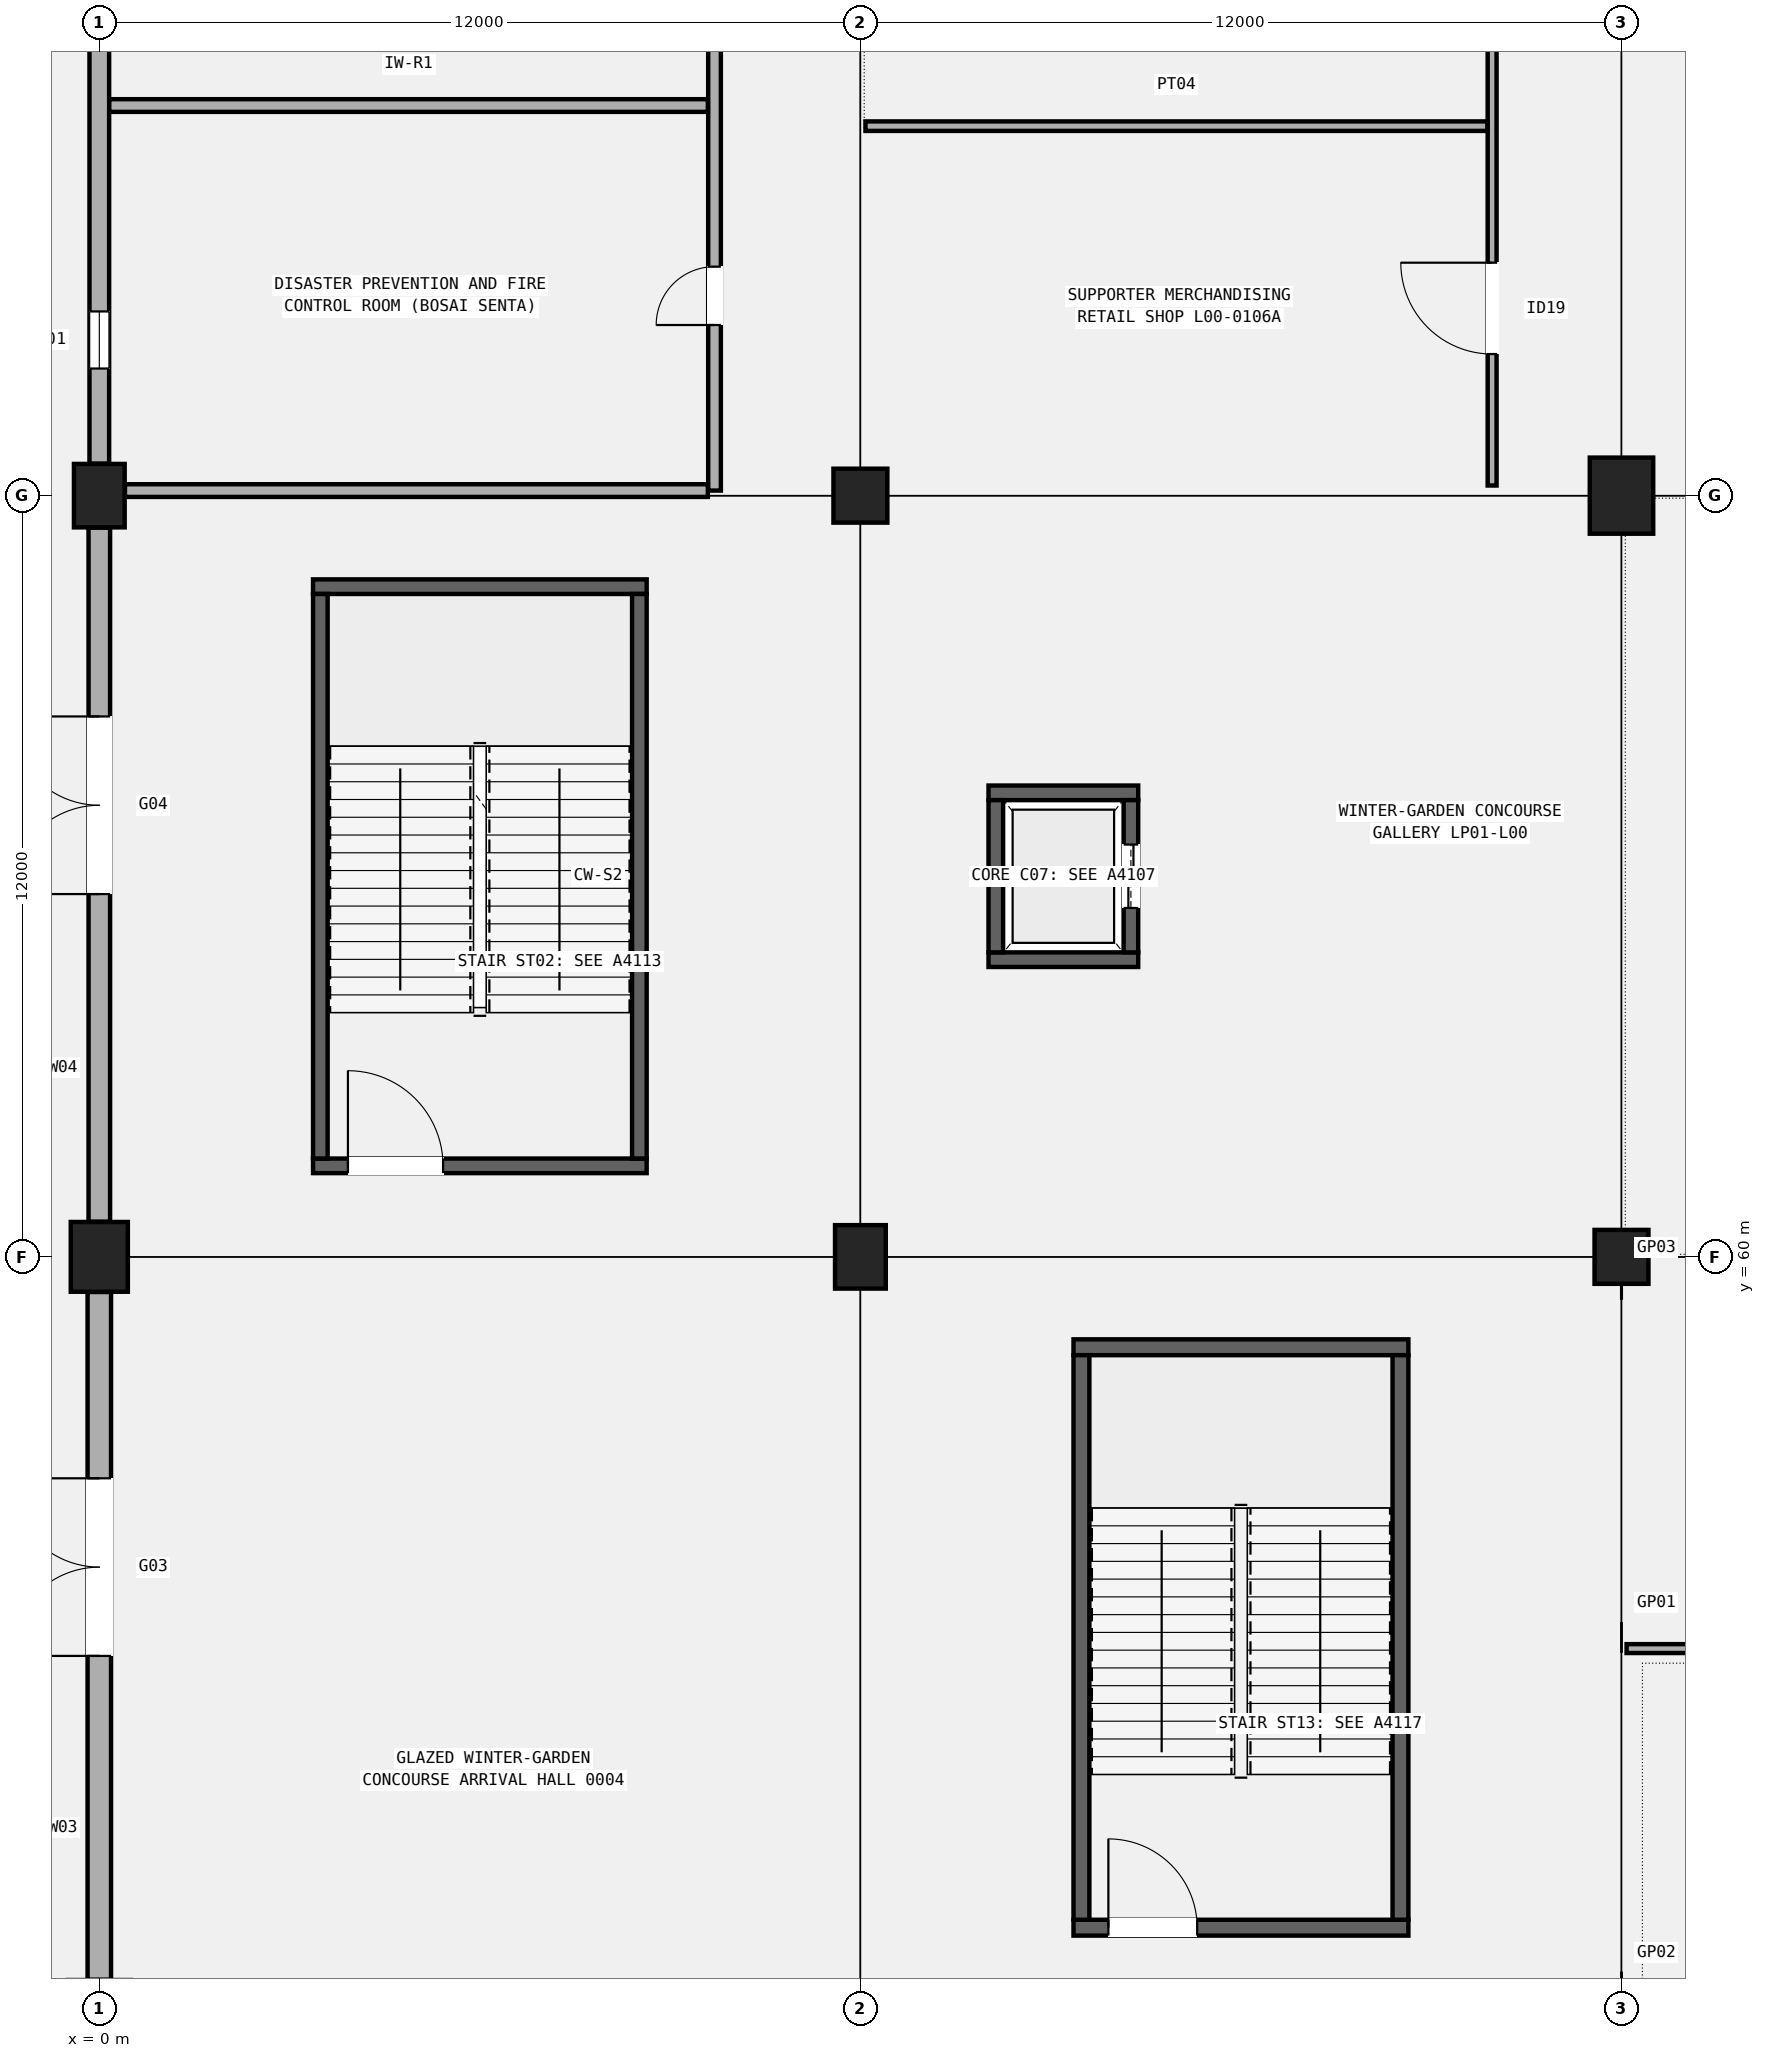
"""IFC4 building model, lengths in metres.
Left out: names, types, materials, properties, quantities, classifications, styles, units other than length and angle.
Written with IfcOpenShell. Run it as: python <this file> out.ifc"""

import sys

from ifc_helpers import new_model, si_unit, direction, frame, frame_2d, origin, origin_2d, place, context, subcontext, project, spatial, rectangle, circle, extrude, element, fill, save


model = new_model("IFC4")
c1 = context("Model", 3, precision=1e-05, world=origin(), true_north=direction((0.0, 1.0)))
c2 = subcontext(c1, "Body", "Model", "MODEL_VIEW")
j1 = project(units=[si_unit("LENGTHUNIT", "METRE"), si_unit("PLANEANGLEUNIT", "RADIAN")], contexts=[c1])
p1 = place(None, origin())
s1 = spatial("IfcSite", under=j1, at=p1, CompositionType="ELEMENT")
p2 = place(p1, origin())
s2 = spatial("IfcBuilding", under=s1, at=p2, CompositionType="ELEMENT")
p3 = place(p2, origin())
s3 = spatial("IfcBuildingStorey", under=s2, at=p3, CompositionType="ELEMENT", Elevation=0.0)
p4 = place(p3, frame((0.0, 60.0, 0.0), z_axis=(0.0, 0.0, 1.0), x_axis=(1.0, 0.0, 0.0)))
e1 = element("IfcColumn", 1, at=p4, inside=s3, PredefinedType="COLUMN", context=c2, shape_type="SweptSolid", body=[
    extrude(rectangle(XDim=0.9, YDim=1.1, at=origin_2d()), origin(), (0.0, 0.0, 1.0), 5.4),
])
for number, where, z_axis, x_axis in (
    (2, (0.0, 72.0, 0.0), (0.0, 0.0, 1.0), (1.0, 0.0, 0.0)),
    (3, (12.0, 60.0, 0.0), (0.0, 0.0, 1.0), (1.0, 0.0, 0.0)),
):
    element("IfcColumn", number, at=place(p3, frame(where, z_axis=z_axis, x_axis=x_axis)), inside=s3, PredefinedType="COLUMN", context=c2, shape_type="SweptSolid", body=[
        extrude(rectangle(XDim=0.8, YDim=1.0, at=origin_2d()), origin(), (0.0, 0.0, 1.0), 5.4),
    ])
for number, where, z_axis, x_axis in (
    (4, (12.0, 72.0, 0.0), (0.0, 0.0, 1.0), (1.0, 0.0, 0.0)),
    (5, (24.0, 60.0, 0.0), (0.0, 0.0, 1.0), (1.0, 0.0, 0.0)),
):
    element("IfcColumn", number, at=place(p3, frame(where, z_axis=z_axis, x_axis=x_axis)), inside=s3, PredefinedType="COLUMN", context=c2, shape_type="SweptSolid", body=[
        extrude(circle(Radius=0.425, at=origin_2d()), origin(), (0.0, 0.0, 1.0), 5.4),
    ])
p5 = place(p3, frame((24.0, 72.0, 0.0), z_axis=(0.0, 0.0, 1.0), x_axis=(1.0, 0.0, 0.0)))
e6 = element("IfcColumn", 6, at=p5, inside=s3, PredefinedType="COLUMN", context=c2, shape_type="SweptSolid", body=[
    extrude(rectangle(XDim=1.0, YDim=1.2, at=origin_2d()), origin(), (0.0, 0.0, 1.0), 5.4),
])
p6 = place(p3, frame((0.0, 48.604, 0.0), z_axis=(0.0, 0.0, 1.0), x_axis=(0.0, 1.0, 0.0)))
e7 = element("IfcWall", 7, at=p6, inside=s3, PredefinedType="SOLIDWALL", context=c2, shape_type="SweptSolid", body=[
    extrude(rectangle(XDim=10.842, YDim=0.37, at=frame_2d((5.421, 0.0))), origin(), (0.0, 0.0, 1.0), 4.34),
])
p7 = place(p6, frame((5.105, 0.0, 0.0)))
e8 = element("IfcOpeningElement", 8, at=p7, cuts=e7, PredefinedType="OPENING", context=c2, shape_type="SweptSolid", body=[
    extrude(rectangle(XDim=2.8, YDim=2.4, at=frame_2d((1.4, 1.2))), frame((0.0, 0.195, 0.0), z_axis=(0.0, -1.0, 0.0), x_axis=(1.0, 0.0, 0.0)), (0.0, 0.0, 1.0), 0.39),
])
p8 = place(p3, frame((0.0, 60.554, 0.0), z_axis=(0.0, 0.0, 1.0), x_axis=(0.0, 1.0, 0.0)))
e9 = element("IfcWall", 9, at=p8, inside=s3, PredefinedType="SOLIDWALL", context=c2, shape_type="SweptSolid", body=[
    extrude(rectangle(XDim=10.942, YDim=0.34, at=frame_2d((5.471, 0.0))), origin(), (0.0, 0.0, 1.0), 4.44),
])
p9 = place(p8, frame((5.165, 0.0, 0.0)))
e10 = element("IfcOpeningElement", 10, at=p9, cuts=e9, PredefinedType="OPENING", context=c2, shape_type="SweptSolid", body=[
    extrude(rectangle(XDim=2.8, YDim=2.4, at=frame_2d((1.4, 1.2))), frame((0.0, 0.18, 0.0), z_axis=(0.0, -1.0, 0.0), x_axis=(1.0, 0.0, 0.0)), (0.0, 0.0, 1.0), 0.36),
])
p10 = place(p3, frame((0.0, 72.504, 0.0), z_axis=(0.0, 0.0, 1.0), x_axis=(0.0, 1.0, 0.0)))
e11 = element("IfcWall", 11, at=p10, inside=s3, PredefinedType="SOLIDWALL", context=c2, shape_type="SweptSolid", body=[
    extrude(rectangle(XDim=11.067, YDim=0.31, at=frame_2d((5.534, 0.0))), origin(), (0.0, 0.0, 1.0), 4.24),
])
p11 = place(p10, frame((1.5, 0.0, 0.95)))
e12 = element("IfcOpeningElement", 12, at=p11, cuts=e11, PredefinedType="OPENING", context=c2, shape_type="SweptSolid", body=[
    extrude(rectangle(XDim=0.9, YDim=2.1, at=frame_2d((0.45, 1.05))), frame((0.0, 0.165, 0.0), z_axis=(0.0, -1.0, 0.0), x_axis=(1.0, 0.0, 0.0)), (0.0, 0.0, 1.0), 0.33),
])
p12 = place(p3, frame((3.37, 61.435, 0.0), z_axis=(0.0, 0.0, 1.0), x_axis=(1.0, 0.0, 0.0)))
e13 = element("IfcWall", 13, at=p12, inside=s3, PredefinedType="SHEAR", context=c2, shape_type="SweptSolid", body=[
    extrude(rectangle(XDim=5.26, YDim=0.23, at=frame_2d((2.63, 0.0))), origin(), (0.0, 0.0, 1.0), 5.14),
])
p13 = place(p12, frame((0.55, 0.0, 0.0)))
e14 = element("IfcOpeningElement", 14, at=p13, cuts=e13, PredefinedType="OPENING", context=c2, shape_type="SweptSolid", body=[
    extrude(rectangle(XDim=1.5, YDim=2.2, at=frame_2d((0.75, 1.1))), frame((0.0, 0.125, 0.0), z_axis=(0.0, -1.0, 0.0), x_axis=(1.0, 0.0, 0.0)), (0.0, 0.0, 1.0), 0.25),
])
p14 = place(p3, frame((3.37, 70.565, 0.0), z_axis=(0.0, 0.0, 1.0), x_axis=(1.0, 0.0, 0.0)))
e15 = element("IfcWall", 15, at=p14, inside=s3, PredefinedType="SHEAR", context=c2, shape_type="SweptSolid", body=[
    extrude(rectangle(XDim=5.26, YDim=0.23, at=frame_2d((2.63, 0.0))), origin(), (0.0, 0.0, 1.0), 5.14),
])
for number, where, z_axis, x_axis in (
    (16, (3.485, 61.55, 0.0), (0.0, 0.0, 1.0), (0.0, 1.0, 0.0)),
    (17, (8.515, 61.55, 0.0), (0.0, 0.0, 1.0), (0.0, 1.0, 0.0)),
):
    element("IfcWall", number, at=place(p3, frame(where, z_axis=z_axis, x_axis=x_axis)), inside=s3, PredefinedType="SHEAR", context=c2, shape_type="SweptSolid", body=[
        extrude(rectangle(XDim=8.9, YDim=0.23, at=frame_2d((4.45, 0.0))), origin(), (0.0, 0.0, 1.0), 5.14),
    ])
p15 = place(p3, frame((15.36, 49.425, 0.0), z_axis=(0.0, 0.0, 1.0), x_axis=(1.0, 0.0, 0.0)))
e18 = element("IfcWall", 18, at=p15, inside=s3, PredefinedType="SHEAR", context=c2, shape_type="SweptSolid", body=[
    extrude(rectangle(XDim=5.28, YDim=0.25, at=frame_2d((2.64, 0.0))), origin(), (0.0, 0.0, 1.0), 5.14),
])
p16 = place(p15, frame((0.55, 0.0, 0.0)))
e19 = element("IfcOpeningElement", 19, at=p16, cuts=e18, PredefinedType="OPENING", context=c2, shape_type="SweptSolid", body=[
    extrude(rectangle(XDim=1.4, YDim=2.15, at=frame_2d((0.7, 1.075))), frame((0.0, 0.135, 0.0), z_axis=(0.0, -1.0, 0.0), x_axis=(1.0, 0.0, 0.0)), (0.0, 0.0, 1.0), 0.27),
])
p17 = place(p3, frame((15.36, 58.575, 0.0), z_axis=(0.0, 0.0, 1.0), x_axis=(1.0, 0.0, 0.0)))
e20 = element("IfcWall", 20, at=p17, inside=s3, PredefinedType="SHEAR", context=c2, shape_type="SweptSolid", body=[
    extrude(rectangle(XDim=5.28, YDim=0.25, at=frame_2d((2.64, 0.0))), origin(), (0.0, 0.0, 1.0), 5.14),
])
for number, where, z_axis, x_axis in (
    (21, (15.485, 49.55, 0.0), (0.0, 0.0, 1.0), (0.0, 1.0, 0.0)),
    (22, (20.515, 49.55, 0.0), (0.0, 0.0, 1.0), (0.0, 1.0, 0.0)),
):
    element("IfcWall", number, at=place(p3, frame(where, z_axis=z_axis, x_axis=x_axis)), inside=s3, PredefinedType="SHEAR", context=c2, shape_type="SweptSolid", body=[
        extrude(rectangle(XDim=8.9, YDim=0.25, at=frame_2d((4.45, 0.0))), origin(), (0.0, 0.0, 1.0), 5.14),
    ])
for number, where, z_axis, x_axis in (
    (23, (14.02, 64.685, 0.0), (0.0, 0.0, 1.0), (1.0, 0.0, 0.0)),
    (24, (14.02, 67.315, 0.0), (0.0, 0.0, 1.0), (1.0, 0.0, 0.0)),
):
    element("IfcWall", number, at=place(p3, frame(where, z_axis=z_axis, x_axis=x_axis)), inside=s3, PredefinedType="SHEAR", context=c2, shape_type="SweptSolid", body=[
        extrude(rectangle(XDim=2.36, YDim=0.23, at=frame_2d((1.18, 0.0))), origin(), (0.0, 0.0, 1.0), 5.14),
    ])
p18 = place(p3, frame((14.135, 64.8, 0.0), z_axis=(0.0, 0.0, 1.0), x_axis=(0.0, 1.0, 0.0)))
e25 = element("IfcWall", 25, at=p18, inside=s3, PredefinedType="SHEAR", context=c2, shape_type="SweptSolid", body=[
    extrude(rectangle(XDim=2.4, YDim=0.23, at=frame_2d((1.2, 0.0))), origin(), (0.0, 0.0, 1.0), 5.14),
])
p19 = place(p3, frame((16.265, 64.8, 0.0), z_axis=(0.0, 0.0, 1.0), x_axis=(0.0, 1.0, 0.0)))
e26 = element("IfcWall", 26, at=p19, inside=s3, PredefinedType="SHEAR", context=c2, shape_type="SweptSolid", body=[
    extrude(rectangle(XDim=2.4, YDim=0.23, at=frame_2d((1.2, 0.0))), origin(), (0.0, 0.0, 1.0), 5.14),
])
p20 = place(p19, frame((0.7, 0.0, 0.0)))
e27 = element("IfcOpeningElement", 27, at=p20, cuts=e26, PredefinedType="OPENING", context=c2, shape_type="SweptSolid", body=[
    extrude(rectangle(XDim=1.0, YDim=2.15, at=frame_2d((0.5, 1.075))), frame((0.0, 0.125, 0.0), z_axis=(0.0, -1.0, 0.0), x_axis=(1.0, 0.0, 0.0)), (0.0, 0.0, 1.0), 0.25),
])
p21 = place(p3, frame((9.7, 72.08, 0.0), z_axis=(0.0, 0.0, 1.0), x_axis=(0.0, 1.0, 0.0)))
e28 = element("IfcWall", 28, at=p21, inside=s3, PredefinedType="SOLIDWALL", context=c2, shape_type="SweptSolid", body=[
    extrude(rectangle(XDim=11.84, YDim=0.2, at=frame_2d((5.92, 0.0))), origin(), (0.0, 0.0, 1.0), 4.52),
])
p22 = place(p21, frame((2.61, 0.0, 0.0)))
e29 = element("IfcOpeningElement", 29, at=p22, cuts=e28, PredefinedType="OPENING", context=c2, shape_type="SweptSolid", body=[
    extrude(rectangle(XDim=0.92, YDim=2.1, at=frame_2d((0.46, 1.05))), frame((0.0, 0.11, 0.0), z_axis=(0.0, -1.0, 0.0), x_axis=(1.0, 0.0, 0.0)), (0.0, 0.0, 1.0), 0.22),
])
p23 = place(p21, frame((8.595, 0.0, 0.0)))
e30 = element("IfcOpeningElement", 30, at=p23, cuts=e28, PredefinedType="OPENING", context=c2, shape_type="SweptSolid", body=[
    extrude(rectangle(XDim=0.95, YDim=2.12, at=frame_2d((0.475, 1.06))), frame((0.0, 0.11, 0.0), z_axis=(0.0, -1.0, 0.0), x_axis=(1.0, 0.0, 0.0)), (0.0, 0.0, 1.0), 0.22),
])
p24 = place(p3, frame((0.157, 78.15, 0.0), z_axis=(0.0, 0.0, 1.0), x_axis=(1.0, 0.0, 0.0)))
e31 = element("IfcWall", 31, at=p24, inside=s3, PredefinedType="SOLIDWALL", context=c2, shape_type="SweptSolid", body=[
    extrude(rectangle(XDim=9.438, YDim=0.2, at=frame_2d((4.719, 0.0))), origin(), (0.0, 0.0, 1.0), 4.52),
])
p25 = place(p3, frame((0.404, 72.08, 0.0), z_axis=(0.0, 0.0, 1.0), x_axis=(1.0, 0.0, 0.0)))
e32 = element("IfcWall", 32, at=p25, inside=s3, PredefinedType="SOLIDWALL", context=c2, shape_type="SweptSolid", body=[
    extrude(rectangle(XDim=9.191, YDim=0.2, at=frame_2d((4.595, 0.0))), origin(), (0.0, 0.0, 1.0), 4.2),
])
p26 = place(p3, frame((21.96, 72.16, 0.0), z_axis=(0.0, 0.0, 1.0), x_axis=(0.0, 1.0, 0.0)))
e33 = element("IfcWall", 33, at=p26, inside=s3, PredefinedType="PARTITIONING", context=c2, shape_type="SweptSolid", body=[
    extrude(rectangle(XDim=11.68, YDim=0.14, at=frame_2d((5.84, 0.0))), origin(), (0.0, 0.0, 1.0), 4.52),
])
p27 = place(p26, frame((2.073, 0.0, 0.0)))
e34 = element("IfcOpeningElement", 34, at=p27, cuts=e33, PredefinedType="OPENING", context=c2, shape_type="SweptSolid", body=[
    extrude(rectangle(XDim=1.44, YDim=2.26, at=frame_2d((0.72, 1.13))), frame((0.0, 0.08, 0.0), z_axis=(0.0, -1.0, 0.0), x_axis=(1.0, 0.0, 0.0)), (0.0, 0.0, 1.0), 0.16),
])
p28 = place(p26, frame((7.972, 0.0, 0.0)))
e35 = element("IfcOpeningElement", 35, at=p28, cuts=e33, PredefinedType="OPENING", context=c2, shape_type="SweptSolid", body=[
    extrude(rectangle(XDim=1.48, YDim=2.24, at=frame_2d((0.74, 1.12))), frame((0.0, 0.08, 0.0), z_axis=(0.0, -1.0, 0.0), x_axis=(1.0, 0.0, 0.0)), (0.0, 0.0, 1.0), 0.16),
])
p29 = place(p3, frame((12.08, 77.825, 0.0), z_axis=(0.0, 0.0, 1.0), x_axis=(1.0, 0.0, 0.0)))
e36 = element("IfcWall", 36, at=p29, inside=s3, PredefinedType="PARTITIONING", context=c2, shape_type="SweptSolid", body=[
    extrude(rectangle(XDim=9.805, YDim=0.15, at=frame_2d((4.902, 0.0))), origin(), (0.0, 0.0, 1.0), 4.52),
])
p30 = place(p3, frame((24.08, 53.825, 0.0), z_axis=(0.0, 0.0, 1.0), x_axis=(1.0, 0.0, 0.0)))
e37 = element("IfcWall", 37, at=p30, inside=s3, PredefinedType="PARTITIONING", context=c2, shape_type="SweptSolid", body=[
    extrude(rectangle(XDim=10.315, YDim=0.14, at=frame_2d((5.157, 0.0))), origin(), (0.0, 0.0, 1.0), 4.52),
])
p31 = place(p7, origin())
e38 = element("IfcDoor", 38, at=p31, inside=s3, OperationType="DOUBLE_DOOR_SINGLE_SWING", PredefinedType="DOOR", context=c2, shape_type="SweptSolid", body=[
    extrude(rectangle(XDim=2.8, YDim=2.4, at=frame_2d((1.4, 1.2))), frame((0.0, 0.025, 0.0), z_axis=(0.0, -1.0, 0.0), x_axis=(1.0, 0.0, 0.0)), (0.0, 0.0, 1.0), 0.05),
])
fill(e8, e38)
p32 = place(p9, origin())
e39 = element("IfcDoor", 39, at=p32, inside=s3, OperationType="DOUBLE_DOOR_SINGLE_SWING", PredefinedType="DOOR", context=c2, shape_type="SweptSolid", body=[
    extrude(rectangle(XDim=2.8, YDim=2.4, at=frame_2d((1.4, 1.2))), frame((0.0, 0.025, 0.0), z_axis=(0.0, -1.0, 0.0), x_axis=(1.0, 0.0, 0.0)), (0.0, 0.0, 1.0), 0.05),
])
fill(e10, e39)
p33 = place(p11, origin())
e40 = element("IfcWindow", 40, at=p33, inside=s3, PartitioningType="SINGLE_PANEL", PredefinedType="WINDOW", context=c2, shape_type="SweptSolid", body=[
    extrude(rectangle(XDim=0.9, YDim=2.1, at=frame_2d((0.45, 1.05))), frame((0.0, 0.03, 0.0), z_axis=(0.0, -1.0, 0.0), x_axis=(1.0, 0.0, 0.0)), (0.0, 0.0, 1.0), 0.06),
])
fill(e12, e40)
p34 = place(p13, origin())
e41 = element("IfcDoor", 41, at=p34, inside=s3, OperationType="SINGLE_SWING_LEFT", PredefinedType="DOOR", context=c2, shape_type="SweptSolid", body=[
    extrude(rectangle(XDim=1.5, YDim=2.2, at=frame_2d((0.75, 1.1))), frame((0.0, 0.025, 0.0), z_axis=(0.0, -1.0, 0.0), x_axis=(1.0, 0.0, 0.0)), (0.0, 0.0, 1.0), 0.05),
])
fill(e14, e41)
p35 = place(p16, origin())
e42 = element("IfcDoor", 42, at=p35, inside=s3, OperationType="SINGLE_SWING_LEFT", PredefinedType="DOOR", context=c2, shape_type="SweptSolid", body=[
    extrude(rectangle(XDim=1.4, YDim=2.15, at=frame_2d((0.7, 1.075))), frame((0.0, 0.025, 0.0), z_axis=(0.0, -1.0, 0.0), x_axis=(1.0, 0.0, 0.0)), (0.0, 0.0, 1.0), 0.05),
])
fill(e19, e42)
p36 = place(p20, origin())
e43 = element("IfcDoor", 43, at=p36, inside=s3, OperationType="DOUBLE_DOOR_SLIDING", PredefinedType="DOOR", context=c2, shape_type="SweptSolid", body=[
    extrude(rectangle(XDim=1.0, YDim=2.15, at=frame_2d((0.5, 1.075))), frame((0.0, 0.025, 0.0), z_axis=(0.0, -1.0, 0.0), x_axis=(1.0, 0.0, 0.0)), (0.0, 0.0, 1.0), 0.05),
])
fill(e27, e43)
p37 = place(p22, origin())
e44 = element("IfcDoor", 44, at=p37, inside=s3, OperationType="SINGLE_SWING_LEFT", PredefinedType="DOOR", context=c2, shape_type="SweptSolid", body=[
    extrude(rectangle(XDim=0.92, YDim=2.1, at=frame_2d((0.46, 1.05))), frame((0.0, 0.025, 0.0), z_axis=(0.0, -1.0, 0.0), x_axis=(1.0, 0.0, 0.0)), (0.0, 0.0, 1.0), 0.05),
])
fill(e29, e44)
p38 = place(p27, origin())
e45 = element("IfcDoor", 45, at=p38, inside=s3, OperationType="SINGLE_SWING_RIGHT", PredefinedType="DOOR", context=c2, shape_type="SweptSolid", body=[
    extrude(rectangle(XDim=1.44, YDim=2.26, at=frame_2d((0.72, 1.13))), frame((0.0, 0.025, 0.0), z_axis=(0.0, -1.0, 0.0), x_axis=(1.0, 0.0, 0.0)), (0.0, 0.0, 1.0), 0.05),
])
fill(e34, e45)
save(model, sys.argv[1])
